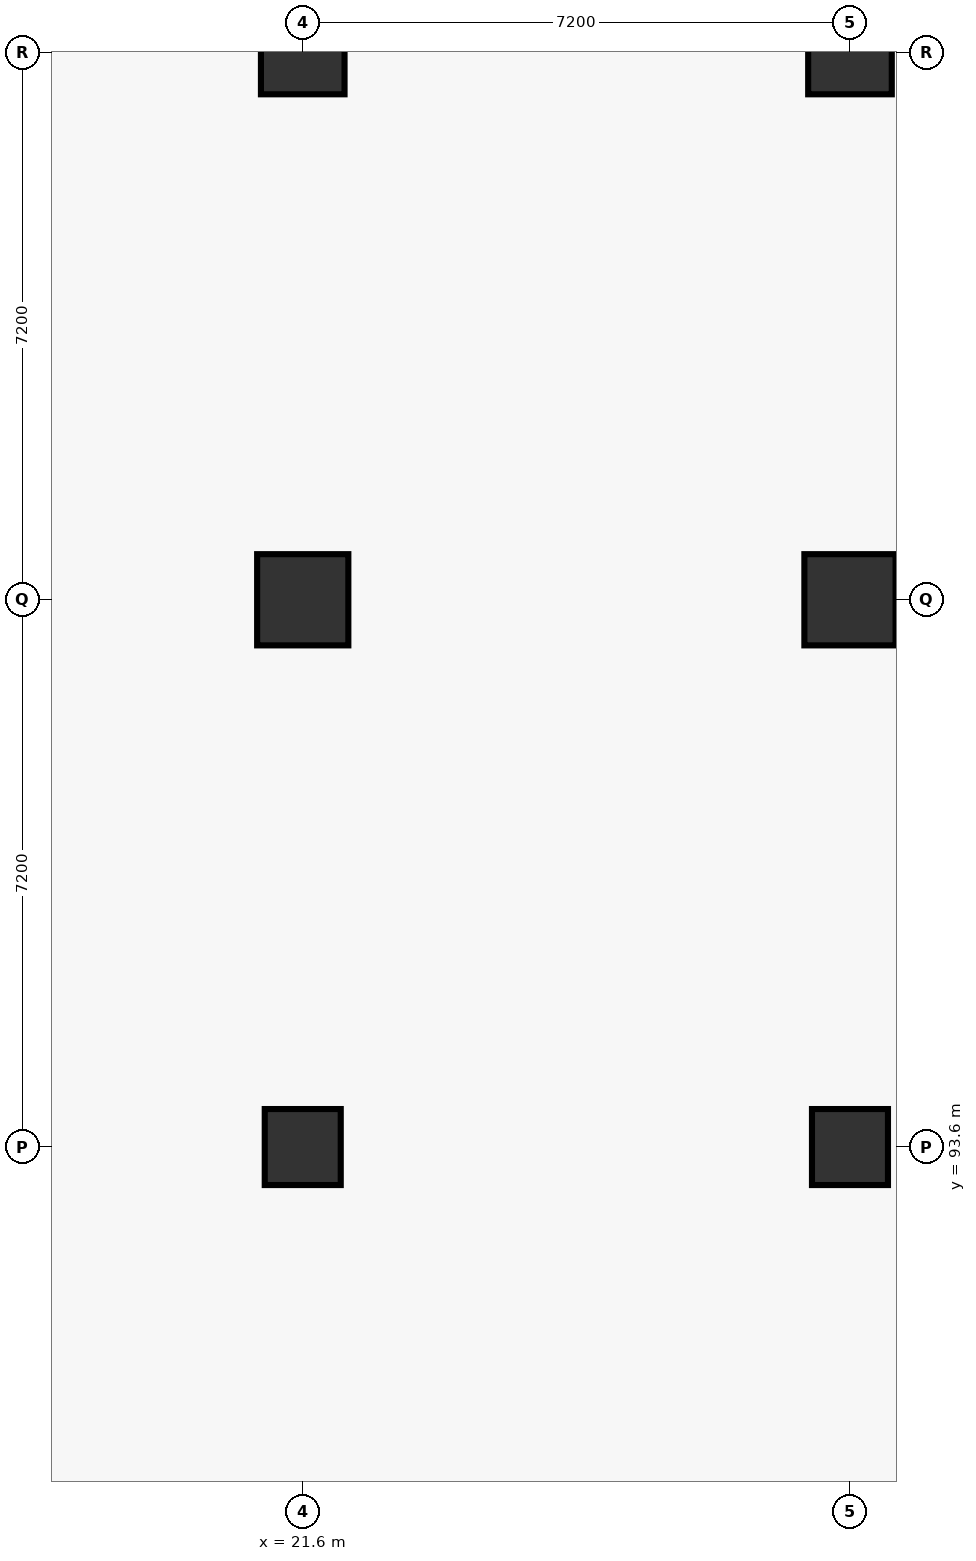
"""IFC4 building model, lengths in metres.
Left out: names, types, materials, properties, quantities, classifications, styles, units other than length and angle.
Written with IfcOpenShell. Run it as: python <this file> out.ifc"""

import sys

from ifc_helpers import new_model, si_unit, direction, frame, origin, origin_2d, place, context, subcontext, project, spatial, rectangle, circle, extrude, element, save


model = new_model("IFC4")
c1 = context("Model", 3, precision=1e-05, world=origin(), true_north=direction((0.0, 1.0)))
c2 = subcontext(c1, "Body", "Model", "MODEL_VIEW")
j1 = project(units=[si_unit("LENGTHUNIT", "METRE"), si_unit("PLANEANGLEUNIT", "RADIAN")], contexts=[c1])
p1 = place(None, origin())
s1 = spatial("IfcSite", under=j1, at=p1, CompositionType="ELEMENT")
p2 = place(p1, origin())
s2 = spatial("IfcBuilding", under=s1, at=p2, CompositionType="ELEMENT")
p3 = place(p2, frame((0.0, 0.0, -5.4)))
s3 = spatial("IfcBuildingStorey", under=s2, at=p3, CompositionType="ELEMENT", Elevation=-5.4)
p4 = place(p3, frame((21.6, 93.6, 0.0), z_axis=(0.0, 0.0, 1.0), x_axis=(1.0, 0.0, 0.0)))
e1 = element("IfcColumn", 1, at=p4, inside=s3, PredefinedType="COLUMN", context=c2, shape_type="SweptSolid", body=[
    extrude(rectangle(XDim=1.0, YDim=1.0, at=origin_2d()), origin(), (0.0, 0.0, 1.0), 5.4),
])
p5 = place(p3, frame((21.6, 100.8, 0.0), z_axis=(0.0, 0.0, 1.0), x_axis=(1.0, 0.0, 0.0)))
e2 = element("IfcColumn", 2, at=p5, inside=s3, PredefinedType="COLUMN", context=c2, shape_type="SweptSolid", body=[
    extrude(circle(Radius=0.6, at=origin_2d()), origin(), (0.0, 0.0, 1.0), 5.4),
])
p6 = place(p3, frame((21.6, 108.0, 0.0), z_axis=(0.0, 0.0, 1.0), x_axis=(1.0, 0.0, 0.0)))
e3 = element("IfcColumn", 3, at=p6, inside=s3, PredefinedType="COLUMN", context=c2, shape_type="SweptSolid", body=[
    extrude(rectangle(XDim=1.1, YDim=1.1, at=origin_2d()), origin(), (0.0, 0.0, 1.0), 5.4),
])
p7 = place(p3, frame((28.8, 93.6, 0.0), z_axis=(0.0, 0.0, 1.0), x_axis=(1.0, 0.0, 0.0)))
e4 = element("IfcColumn", 4, at=p7, inside=s3, PredefinedType="COLUMN", context=c2, shape_type="SweptSolid", body=[
    extrude(rectangle(XDim=1.0, YDim=1.0, at=origin_2d()), origin(), (0.0, 0.0, 1.0), 5.4),
])
p8 = place(p3, frame((28.8, 100.8, 0.0), z_axis=(0.0, 0.0, 1.0), x_axis=(1.0, 0.0, 0.0)))
e5 = element("IfcColumn", 5, at=p8, inside=s3, PredefinedType="COLUMN", context=c2, shape_type="SweptSolid", body=[
    extrude(circle(Radius=0.6, at=origin_2d()), origin(), (0.0, 0.0, 1.0), 5.4),
])
p9 = place(p3, frame((28.8, 108.0, 0.0), z_axis=(0.0, 0.0, 1.0), x_axis=(1.0, 0.0, 0.0)))
e6 = element("IfcColumn", 6, at=p9, inside=s3, PredefinedType="COLUMN", context=c2, shape_type="SweptSolid", body=[
    extrude(rectangle(XDim=1.1, YDim=1.1, at=origin_2d()), origin(), (0.0, 0.0, 1.0), 5.4),
])
save(model, sys.argv[1])
